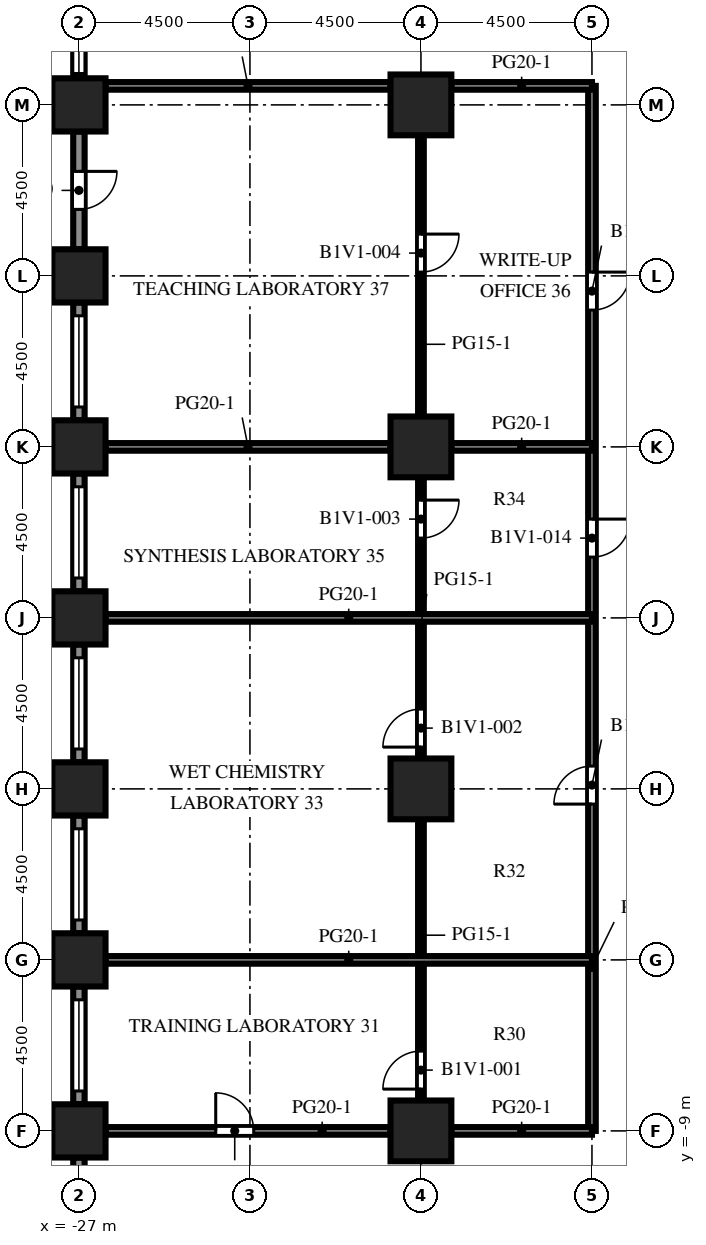
"""IFC4 building model, lengths in metres.
Left out: names, types, materials, properties, quantities, classifications, styles, units other than length and angle.
Written with IfcOpenShell. Run it as: python <this file> out.ifc"""

import sys

from ifc_helpers import new_model, si_unit, direction, frame, frame_2d, origin, origin_2d, place, context, subcontext, project, spatial, rectangle, extrude, element, fill, save


model = new_model("IFC4")
c1 = context("Model", 3, precision=1e-05, world=origin(), true_north=direction((0.0, 1.0)))
c2 = subcontext(c1, "Body", "Model", "MODEL_VIEW")
j1 = project(units=[si_unit("LENGTHUNIT", "METRE"), si_unit("PLANEANGLEUNIT", "RADIAN")], contexts=[c1])
p1 = place(None, origin())
s1 = spatial("IfcSite", under=j1, at=p1, CompositionType="ELEMENT")
p2 = place(p1, origin())
s2 = spatial("IfcBuilding", under=s1, at=p2, CompositionType="ELEMENT")
p3 = place(p2, frame((0.0, 0.0, 19.5)))
s3 = spatial("IfcBuildingStorey", under=s2, at=p3, CompositionType="ELEMENT", Elevation=19.5)
for number, where, z_axis, x_axis in (
    (1, (-27.0, -9.0, 0.0), (0.0, 0.0, 1.0), (1.0, 0.0, 0.0)),
    (2, (-27.0, -4.5, 0.0), (0.0, 0.0, 1.0), (1.0, 0.0, 0.0)),
    (3, (-27.0, 0.0, 0.0), (0.0, 0.0, 1.0), (1.0, 0.0, 0.0)),
    (4, (-27.0, 4.5, 0.0), (0.0, 0.0, 1.0), (1.0, 0.0, 0.0)),
    (5, (-27.0, 9.0, 0.0), (0.0, 0.0, 1.0), (1.0, 0.0, 0.0)),
    (6, (-27.0, 13.5, 0.0), (0.0, 0.0, 1.0), (1.0, 0.0, 0.0)),
    (7, (-27.0, 18.0, 0.0), (0.0, 0.0, 1.0), (1.0, 0.0, 0.0)),
):
    element("IfcColumn", number, at=place(p3, frame(where, z_axis=z_axis, x_axis=x_axis)), inside=s3, PredefinedType="COLUMN", context=c2, shape_type="SweptSolid", body=[
        extrude(rectangle(XDim=1.4, YDim=1.4, at=origin_2d()), origin(), (0.0, 0.0, 1.0), 4.1),
    ])
for number, where, z_axis, x_axis in (
    (8, (-18.0, -9.0, 0.0), (0.0, 0.0, 1.0), (1.0, 0.0, 0.0)),
    (9, (-18.0, 0.0, 0.0), (0.0, 0.0, 1.0), (1.0, 0.0, 0.0)),
    (10, (-18.0, 9.0, 0.0), (0.0, 0.0, 1.0), (1.0, 0.0, 0.0)),
    (11, (-18.0, 18.0, 0.0), (0.0, 0.0, 1.0), (1.0, 0.0, 0.0)),
):
    element("IfcColumn", number, at=place(p3, frame(where, z_axis=z_axis, x_axis=x_axis)), inside=s3, PredefinedType="COLUMN", context=c2, shape_type="SweptSolid", body=[
        extrude(rectangle(XDim=1.6, YDim=1.6, at=origin_2d()), origin(), (0.0, 0.0, 1.0), 4.1),
    ])
p4 = place(p3, frame((-27.0, 18.7, 0.0), z_axis=(0.0, 0.0, 1.0), x_axis=(0.0, 1.0, 0.0)))
e12 = element("IfcWall", 12, at=p4, inside=s3, PredefinedType="SOLIDWALL", context=c2, shape_type="SweptSolid", body=[
    extrude(rectangle(XDim=3.1, YDim=0.3, at=frame_2d((1.55, 0.0))), origin(), (0.0, 0.0, 1.0), 2.75),
])
p5 = place(p4, frame((0.125, 0.0, 0.8)))
e13 = element("IfcOpeningElement", 13, at=p5, cuts=e12, PredefinedType="OPENING", context=c2, shape_type="SweptSolid", body=[
    extrude(rectangle(XDim=2.4, YDim=1.7, at=frame_2d((1.2, 0.85))), frame((0.0, 0.16, 0.0), z_axis=(0.0, -1.0, 0.0), x_axis=(1.0, 0.0, 0.0)), (0.0, 0.0, 1.0), 0.32),
])
p6 = place(p3, frame((-27.0, 14.2, 0.0), z_axis=(0.0, 0.0, 1.0), x_axis=(0.0, 1.0, 0.0)))
e14 = element("IfcWall", 14, at=p6, inside=s3, PredefinedType="SOLIDWALL", context=c2, shape_type="SweptSolid", body=[
    extrude(rectangle(XDim=3.1, YDim=0.3, at=frame_2d((1.55, 0.0))), origin(), (0.0, 0.0, 1.0), 2.75),
])
p7 = place(p6, frame((1.05, 0.0, 0.0)))
e15 = element("IfcOpeningElement", 15, at=p7, cuts=e14, PredefinedType="OPENING", context=c2, shape_type="SweptSolid", body=[
    extrude(rectangle(XDim=1.0, YDim=2.2, at=frame_2d((0.5, 1.1))), frame((0.0, 0.16, 0.0), z_axis=(0.0, -1.0, 0.0), x_axis=(1.0, 0.0, 0.0)), (0.0, 0.0, 1.0), 0.32),
])
p8 = place(p3, frame((-27.0, 9.7, 0.0), z_axis=(0.0, 0.0, 1.0), x_axis=(0.0, 1.0, 0.0)))
e16 = element("IfcWall", 16, at=p8, inside=s3, PredefinedType="SOLIDWALL", context=c2, shape_type="SweptSolid", body=[
    extrude(rectangle(XDim=3.1, YDim=0.3, at=frame_2d((1.55, 0.0))), origin(), (0.0, 0.0, 1.0), 2.75),
])
p9 = place(p8, frame((0.35, 0.0, 0.8)))
e17 = element("IfcOpeningElement", 17, at=p9, cuts=e16, PredefinedType="OPENING", context=c2, shape_type="SweptSolid", body=[
    extrude(rectangle(XDim=2.4, YDim=1.7, at=frame_2d((1.2, 0.85))), frame((0.0, 0.16, 0.0), z_axis=(0.0, -1.0, 0.0), x_axis=(1.0, 0.0, 0.0)), (0.0, 0.0, 1.0), 0.32),
])
p10 = place(p3, frame((-27.0, 5.2, 0.0), z_axis=(0.0, 0.0, 1.0), x_axis=(0.0, 1.0, 0.0)))
e18 = element("IfcWall", 18, at=p10, inside=s3, PredefinedType="SOLIDWALL", context=c2, shape_type="SweptSolid", body=[
    extrude(rectangle(XDim=3.1, YDim=0.3, at=frame_2d((1.55, 0.0))), origin(), (0.0, 0.0, 1.0), 2.75),
])
p11 = place(p10, frame((0.35, 0.0, 0.8)))
e19 = element("IfcOpeningElement", 19, at=p11, cuts=e18, PredefinedType="OPENING", context=c2, shape_type="SweptSolid", body=[
    extrude(rectangle(XDim=2.4, YDim=1.7, at=frame_2d((1.2, 0.85))), frame((0.0, 0.16, 0.0), z_axis=(0.0, -1.0, 0.0), x_axis=(1.0, 0.0, 0.0)), (0.0, 0.0, 1.0), 0.32),
])
p12 = place(p3, frame((-27.0, 0.7, 0.0), z_axis=(0.0, 0.0, 1.0), x_axis=(0.0, 1.0, 0.0)))
e20 = element("IfcWall", 20, at=p12, inside=s3, PredefinedType="SOLIDWALL", context=c2, shape_type="SweptSolid", body=[
    extrude(rectangle(XDim=3.1, YDim=0.3, at=frame_2d((1.55, 0.0))), origin(), (0.0, 0.0, 1.0), 2.75),
])
p13 = place(p12, frame((0.35, 0.0, 0.8)))
e21 = element("IfcOpeningElement", 21, at=p13, cuts=e20, PredefinedType="OPENING", context=c2, shape_type="SweptSolid", body=[
    extrude(rectangle(XDim=2.4, YDim=1.7, at=frame_2d((1.2, 0.85))), frame((0.0, 0.16, 0.0), z_axis=(0.0, -1.0, 0.0), x_axis=(1.0, 0.0, 0.0)), (0.0, 0.0, 1.0), 0.32),
])
p14 = place(p3, frame((-27.0, -3.8, 0.0), z_axis=(0.0, 0.0, 1.0), x_axis=(0.0, 1.0, 0.0)))
e22 = element("IfcWall", 22, at=p14, inside=s3, PredefinedType="SOLIDWALL", context=c2, shape_type="SweptSolid", body=[
    extrude(rectangle(XDim=3.1, YDim=0.3, at=frame_2d((1.55, 0.0))), origin(), (0.0, 0.0, 1.0), 2.75),
])
p15 = place(p14, frame((0.35, 0.0, 0.8)))
e23 = element("IfcOpeningElement", 23, at=p15, cuts=e22, PredefinedType="OPENING", context=c2, shape_type="SweptSolid", body=[
    extrude(rectangle(XDim=2.4, YDim=1.7, at=frame_2d((1.2, 0.85))), frame((0.0, 0.16, 0.0), z_axis=(0.0, -1.0, 0.0), x_axis=(1.0, 0.0, 0.0)), (0.0, 0.0, 1.0), 0.32),
])
p16 = place(p3, frame((-27.0, -8.3, 0.0), z_axis=(0.0, 0.0, 1.0), x_axis=(0.0, 1.0, 0.0)))
e24 = element("IfcWall", 24, at=p16, inside=s3, PredefinedType="SOLIDWALL", context=c2, shape_type="SweptSolid", body=[
    extrude(rectangle(XDim=3.1, YDim=0.3, at=frame_2d((1.55, 0.0))), origin(), (0.0, 0.0, 1.0), 2.75),
])
p17 = place(p16, frame((0.35, 0.0, 0.8)))
e25 = element("IfcOpeningElement", 25, at=p17, cuts=e24, PredefinedType="OPENING", context=c2, shape_type="SweptSolid", body=[
    extrude(rectangle(XDim=2.4, YDim=1.7, at=frame_2d((1.2, 0.85))), frame((0.0, 0.16, 0.0), z_axis=(0.0, -1.0, 0.0), x_axis=(1.0, 0.0, 0.0)), (0.0, 0.0, 1.0), 0.32),
])
p18 = place(p3, frame((-27.0, -12.8, 0.0), z_axis=(0.0, 0.0, 1.0), x_axis=(0.0, 1.0, 0.0)))
e26 = element("IfcWall", 26, at=p18, inside=s3, PredefinedType="SOLIDWALL", context=c2, shape_type="SweptSolid", body=[
    extrude(rectangle(XDim=3.1, YDim=0.3, at=frame_2d((1.55, 0.0))), origin(), (0.0, 0.0, 1.0), 2.75),
])
p19 = place(p18, frame((1.425, 0.0, 0.8)))
e27 = element("IfcOpeningElement", 27, at=p19, cuts=e26, PredefinedType="OPENING", context=c2, shape_type="SweptSolid", body=[
    extrude(rectangle(XDim=1.2, YDim=1.7, at=frame_2d((0.6, 0.85))), frame((0.0, 0.16, 0.0), z_axis=(0.0, -1.0, 0.0), x_axis=(1.0, 0.0, 0.0)), (0.0, 0.0, 1.0), 0.32),
])
p20 = place(p3, frame((-18.0, -0.8, 0.0), z_axis=(0.0, 0.0, 1.0), x_axis=(0.0, -1.0, 0.0)))
e28 = element("IfcWall", 28, at=p20, inside=s3, PredefinedType="PARTITIONING", context=c2, shape_type="SweptSolid", body=[
    extrude(rectangle(XDim=7.4, YDim=0.15, at=frame_2d((3.7, 0.0))), origin(), (0.0, 0.0, 1.0), 3.65),
])
p21 = place(p20, frame((6.1, 0.0, 0.0)))
e29 = element("IfcOpeningElement", 29, at=p21, cuts=e28, PredefinedType="OPENING", context=c2, shape_type="SweptSolid", body=[
    extrude(rectangle(XDim=1.0, YDim=2.1, at=frame_2d((0.5, 1.05))), frame((0.0, 0.085, 0.0), z_axis=(0.0, -1.0, 0.0), x_axis=(1.0, 0.0, 0.0)), (0.0, 0.0, 1.0), 0.17),
])
p22 = place(p3, frame((-18.0, 0.8, 0.0), z_axis=(0.0, 0.0, 1.0), x_axis=(0.0, 1.0, 0.0)))
e30 = element("IfcWall", 30, at=p22, inside=s3, PredefinedType="PARTITIONING", context=c2, shape_type="SweptSolid", body=[
    extrude(rectangle(XDim=7.4, YDim=0.15, at=frame_2d((3.7, 0.0))), origin(), (0.0, 0.0, 1.0), 3.65),
])
p23 = place(p22, frame((0.3, 0.0, 0.0)))
e31 = element("IfcOpeningElement", 31, at=p23, cuts=e30, PredefinedType="OPENING", context=c2, shape_type="SweptSolid", body=[
    extrude(rectangle(XDim=1.0, YDim=2.1, at=frame_2d((0.5, 1.05))), frame((0.0, 0.085, 0.0), z_axis=(0.0, -1.0, 0.0), x_axis=(1.0, 0.0, 0.0)), (0.0, 0.0, 1.0), 0.17),
])
p24 = place(p22, frame((5.8, 0.0, 0.0)))
e32 = element("IfcOpeningElement", 32, at=p24, cuts=e30, PredefinedType="OPENING", context=c2, shape_type="SweptSolid", body=[
    extrude(rectangle(XDim=1.0, YDim=2.1, at=frame_2d((0.5, 1.05))), frame((0.0, 0.085, 0.0), z_axis=(0.0, -1.0, 0.0), x_axis=(1.0, 0.0, 0.0)), (0.0, 0.0, 1.0), 0.17),
])
p25 = place(p3, frame((-18.0, 9.8, 0.0), z_axis=(0.0, 0.0, 1.0), x_axis=(0.0, 1.0, 0.0)))
e33 = element("IfcWall", 33, at=p25, inside=s3, PredefinedType="PARTITIONING", context=c2, shape_type="SweptSolid", body=[
    extrude(rectangle(XDim=7.4, YDim=0.15, at=frame_2d((3.7, 0.0))), origin(), (0.0, 0.0, 1.0), 3.65),
])
p26 = place(p25, frame((3.8, 0.0, 0.0)))
e34 = element("IfcOpeningElement", 34, at=p26, cuts=e33, PredefinedType="OPENING", context=c2, shape_type="SweptSolid", body=[
    extrude(rectangle(XDim=1.0, YDim=2.1, at=frame_2d((0.5, 1.05))), frame((0.0, 0.085, 0.0), z_axis=(0.0, -1.0, 0.0), x_axis=(1.0, 0.0, 0.0)), (0.0, 0.0, 1.0), 0.17),
])
p27 = place(p3, frame((-13.5, -9.0, 0.0), z_axis=(0.0, 0.0, 1.0), x_axis=(0.0, 1.0, 0.0)))
e35 = element("IfcWall", 35, at=p27, inside=s3, PredefinedType="PARTITIONING", context=c2, shape_type="SweptSolid", body=[
    extrude(rectangle(XDim=27.5, YDim=0.2, at=frame_2d((13.75, 0.0))), origin(), (0.0, 0.0, 1.0), 3.65),
])
p28 = place(p27, frame((8.6, 0.0, 0.0)))
e36 = element("IfcOpeningElement", 36, at=p28, cuts=e35, PredefinedType="OPENING", context=c2, shape_type="SweptSolid", body=[
    extrude(rectangle(XDim=1.0, YDim=2.1, at=frame_2d((0.5, 1.05))), frame((0.0, 0.11, 0.0), z_axis=(0.0, -1.0, 0.0), x_axis=(1.0, 0.0, 0.0)), (0.0, 0.0, 1.0), 0.22),
])
p29 = place(p27, frame((15.1, 0.0, 0.0)))
e37 = element("IfcOpeningElement", 37, at=p29, cuts=e35, PredefinedType="OPENING", context=c2, shape_type="SweptSolid", body=[
    extrude(rectangle(XDim=1.0, YDim=2.1, at=frame_2d((0.5, 1.05))), frame((0.0, 0.11, 0.0), z_axis=(0.0, -1.0, 0.0), x_axis=(1.0, 0.0, 0.0)), (0.0, 0.0, 1.0), 0.22),
])
p30 = place(p27, frame((21.6, 0.0, 0.0)))
e38 = element("IfcOpeningElement", 38, at=p30, cuts=e35, PredefinedType="OPENING", context=c2, shape_type="SweptSolid", body=[
    extrude(rectangle(XDim=1.0, YDim=2.1, at=frame_2d((0.5, 1.05))), frame((0.0, 0.11, 0.0), z_axis=(0.0, -1.0, 0.0), x_axis=(1.0, 0.0, 0.0)), (0.0, 0.0, 1.0), 0.22),
])
p31 = place(p3, frame((-26.3, -9.0, 0.0), z_axis=(0.0, 0.0, 1.0), x_axis=(1.0, 0.0, 0.0)))
e39 = element("IfcWall", 39, at=p31, inside=s3, PredefinedType="PARTITIONING", context=c2, shape_type="SweptSolid", body=[
    extrude(rectangle(XDim=7.5, YDim=0.2, at=frame_2d((3.75, 0.0))), origin(), (0.0, 0.0, 1.0), 3.65),
])
p32 = place(p31, frame((2.9, 0.0, 0.0)))
e40 = element("IfcOpeningElement", 40, at=p32, cuts=e39, PredefinedType="OPENING", context=c2, shape_type="SweptSolid", body=[
    extrude(rectangle(XDim=1.0, YDim=2.1, at=frame_2d((0.5, 1.05))), frame((0.0, 0.11, 0.0), z_axis=(0.0, -1.0, 0.0), x_axis=(1.0, 0.0, 0.0)), (0.0, 0.0, 1.0), 0.22),
])
p33 = place(p3, frame((-17.2, -9.0, 0.0), z_axis=(0.0, 0.0, 1.0), x_axis=(1.0, 0.0, 0.0)))
e41 = element("IfcWall", 41, at=p33, inside=s3, PredefinedType="PARTITIONING", context=c2, shape_type="SweptSolid", body=[
    extrude(rectangle(XDim=3.7, YDim=0.2, at=frame_2d((1.85, 0.0))), origin(), (0.0, 0.0, 1.0), 3.65),
])
for number, where, z_axis, x_axis in (
    (42, (-26.3, -4.5, 0.0), (0.0, 0.0, 1.0), (1.0, 0.0, 0.0)),
    (43, (-26.3, 4.5, 0.0), (0.0, 0.0, 1.0), (1.0, 0.0, 0.0)),
):
    element("IfcWall", number, at=place(p3, frame(where, z_axis=z_axis, x_axis=x_axis)), inside=s3, PredefinedType="PARTITIONING", context=c2, shape_type="SweptSolid", body=[
        extrude(rectangle(XDim=12.8, YDim=0.2, at=frame_2d((6.4, 0.0))), origin(), (0.0, 0.0, 1.0), 3.65),
    ])
p34 = place(p3, frame((-26.3, 9.0, 0.0), z_axis=(0.0, 0.0, 1.0), x_axis=(1.0, 0.0, 0.0)))
e44 = element("IfcWall", 44, at=p34, inside=s3, PredefinedType="PARTITIONING", context=c2, shape_type="SweptSolid", body=[
    extrude(rectangle(XDim=7.5, YDim=0.2, at=frame_2d((3.75, 0.0))), origin(), (0.0, 0.0, 1.0), 3.65),
])
p35 = place(p3, frame((-17.2, 9.0, 0.0), z_axis=(0.0, 0.0, 1.0), x_axis=(1.0, 0.0, 0.0)))
e45 = element("IfcWall", 45, at=p35, inside=s3, PredefinedType="PARTITIONING", context=c2, shape_type="SweptSolid", body=[
    extrude(rectangle(XDim=3.7, YDim=0.2, at=frame_2d((1.85, 0.0))), origin(), (0.0, 0.0, 1.0), 3.65),
])
p36 = place(p3, frame((-26.3, 18.5, 0.0), z_axis=(0.0, 0.0, 1.0), x_axis=(1.0, 0.0, 0.0)))
e46 = element("IfcWall", 46, at=p36, inside=s3, PredefinedType="PARTITIONING", context=c2, shape_type="SweptSolid", body=[
    extrude(rectangle(XDim=7.5, YDim=0.2, at=frame_2d((3.75, 0.0))), origin(), (0.0, 0.0, 1.0), 3.65),
])
p37 = place(p3, frame((-17.2, 18.5, 0.0), z_axis=(0.0, 0.0, 1.0), x_axis=(1.0, 0.0, 0.0)))
e47 = element("IfcWall", 47, at=p37, inside=s3, PredefinedType="PARTITIONING", context=c2, shape_type="SweptSolid", body=[
    extrude(rectangle(XDim=3.7, YDim=0.2, at=frame_2d((1.85, 0.0))), origin(), (0.0, 0.0, 1.0), 3.65),
])
p38 = place(p5, origin())
e48 = element("IfcWindow", 48, at=p38, inside=s3, PartitioningType="SINGLE_PANEL", PredefinedType="WINDOW", context=c2, shape_type="SweptSolid", body=[
    extrude(rectangle(XDim=2.4, YDim=1.7, at=frame_2d((1.2, 0.85))), frame((0.0, 0.03, 0.0), z_axis=(0.0, -1.0, 0.0), x_axis=(1.0, 0.0, 0.0)), (0.0, 0.0, 1.0), 0.06),
])
fill(e13, e48)
p39 = place(p7, origin())
e49 = element("IfcDoor", 49, at=p39, inside=s3, OperationType="SINGLE_SWING_RIGHT", PredefinedType="DOOR", context=c2, shape_type="SweptSolid", body=[
    extrude(rectangle(XDim=1.0, YDim=2.2, at=frame_2d((0.5, 1.1))), frame((0.0, 0.025, 0.0), z_axis=(0.0, -1.0, 0.0), x_axis=(1.0, 0.0, 0.0)), (0.0, 0.0, 1.0), 0.05),
])
fill(e15, e49)
p40 = place(p9, origin())
e50 = element("IfcWindow", 50, at=p40, inside=s3, PartitioningType="SINGLE_PANEL", PredefinedType="WINDOW", context=c2, shape_type="SweptSolid", body=[
    extrude(rectangle(XDim=2.4, YDim=1.7, at=frame_2d((1.2, 0.85))), frame((0.0, 0.03, 0.0), z_axis=(0.0, -1.0, 0.0), x_axis=(1.0, 0.0, 0.0)), (0.0, 0.0, 1.0), 0.06),
])
fill(e17, e50)
p41 = place(p11, origin())
e51 = element("IfcWindow", 51, at=p41, inside=s3, PartitioningType="SINGLE_PANEL", PredefinedType="WINDOW", context=c2, shape_type="SweptSolid", body=[
    extrude(rectangle(XDim=2.4, YDim=1.7, at=frame_2d((1.2, 0.85))), frame((0.0, 0.03, 0.0), z_axis=(0.0, -1.0, 0.0), x_axis=(1.0, 0.0, 0.0)), (0.0, 0.0, 1.0), 0.06),
])
fill(e19, e51)
p42 = place(p13, origin())
e52 = element("IfcWindow", 52, at=p42, inside=s3, PartitioningType="SINGLE_PANEL", PredefinedType="WINDOW", context=c2, shape_type="SweptSolid", body=[
    extrude(rectangle(XDim=2.4, YDim=1.7, at=frame_2d((1.2, 0.85))), frame((0.0, 0.03, 0.0), z_axis=(0.0, -1.0, 0.0), x_axis=(1.0, 0.0, 0.0)), (0.0, 0.0, 1.0), 0.06),
])
fill(e21, e52)
p43 = place(p15, origin())
e53 = element("IfcWindow", 53, at=p43, inside=s3, PartitioningType="SINGLE_PANEL", PredefinedType="WINDOW", context=c2, shape_type="SweptSolid", body=[
    extrude(rectangle(XDim=2.4, YDim=1.7, at=frame_2d((1.2, 0.85))), frame((0.0, 0.03, 0.0), z_axis=(0.0, -1.0, 0.0), x_axis=(1.0, 0.0, 0.0)), (0.0, 0.0, 1.0), 0.06),
])
fill(e23, e53)
p44 = place(p17, origin())
e54 = element("IfcWindow", 54, at=p44, inside=s3, PartitioningType="SINGLE_PANEL", PredefinedType="WINDOW", context=c2, shape_type="SweptSolid", body=[
    extrude(rectangle(XDim=2.4, YDim=1.7, at=frame_2d((1.2, 0.85))), frame((0.0, 0.03, 0.0), z_axis=(0.0, -1.0, 0.0), x_axis=(1.0, 0.0, 0.0)), (0.0, 0.0, 1.0), 0.06),
])
fill(e25, e54)
p45 = place(p21, origin())
e55 = element("IfcDoor", 55, at=p45, inside=s3, OperationType="SINGLE_SWING_RIGHT", PredefinedType="DOOR", context=c2, shape_type="SweptSolid", body=[
    extrude(rectangle(XDim=1.0, YDim=2.1, at=frame_2d((0.5, 1.05))), frame((0.0, 0.025, 0.0), z_axis=(0.0, -1.0, 0.0), x_axis=(1.0, 0.0, 0.0)), (0.0, 0.0, 1.0), 0.05),
])
fill(e29, e55)
p46 = place(p23, origin())
e56 = element("IfcDoor", 56, at=p46, inside=s3, OperationType="SINGLE_SWING_LEFT", PredefinedType="DOOR", context=c2, shape_type="SweptSolid", body=[
    extrude(rectangle(XDim=1.0, YDim=2.1, at=frame_2d((0.5, 1.05))), frame((0.0, 0.025, 0.0), z_axis=(0.0, -1.0, 0.0), x_axis=(1.0, 0.0, 0.0)), (0.0, 0.0, 1.0), 0.05),
])
fill(e31, e56)
p47 = place(p24, origin())
e57 = element("IfcDoor", 57, at=p47, inside=s3, OperationType="SINGLE_SWING_RIGHT", PredefinedType="DOOR", context=c2, shape_type="SweptSolid", body=[
    extrude(rectangle(XDim=1.0, YDim=2.1, at=frame_2d((0.5, 1.05))), frame((0.0, 0.025, 0.0), z_axis=(0.0, -1.0, 0.0), x_axis=(1.0, 0.0, 0.0)), (0.0, 0.0, 1.0), 0.05),
])
fill(e32, e57)
p48 = place(p26, origin())
e58 = element("IfcDoor", 58, at=p48, inside=s3, OperationType="SINGLE_SWING_RIGHT", PredefinedType="DOOR", context=c2, shape_type="SweptSolid", body=[
    extrude(rectangle(XDim=1.0, YDim=2.1, at=frame_2d((0.5, 1.05))), frame((0.0, 0.025, 0.0), z_axis=(0.0, -1.0, 0.0), x_axis=(1.0, 0.0, 0.0)), (0.0, 0.0, 1.0), 0.05),
])
fill(e34, e58)
p49 = place(p28, origin())
e59 = element("IfcDoor", 59, at=p49, inside=s3, OperationType="SINGLE_SWING_LEFT", PredefinedType="DOOR", context=c2, shape_type="SweptSolid", body=[
    extrude(rectangle(XDim=1.0, YDim=2.1, at=frame_2d((0.5, 1.05))), frame((0.0, 0.025, 0.0), z_axis=(0.0, -1.0, 0.0), x_axis=(1.0, 0.0, 0.0)), (0.0, 0.0, 1.0), 0.05),
])
fill(e36, e59)
p50 = place(p29, origin())
e60 = element("IfcDoor", 60, at=p50, inside=s3, OperationType="SINGLE_SWING_RIGHT", PredefinedType="DOOR", context=c2, shape_type="SweptSolid", body=[
    extrude(rectangle(XDim=1.0, YDim=2.1, at=frame_2d((0.5, 1.05))), frame((0.0, 0.025, 0.0), z_axis=(0.0, -1.0, 0.0), x_axis=(1.0, 0.0, 0.0)), (0.0, 0.0, 1.0), 0.05),
])
fill(e37, e60)
p51 = place(p30, origin())
e61 = element("IfcDoor", 61, at=p51, inside=s3, OperationType="SINGLE_SWING_RIGHT", PredefinedType="DOOR", context=c2, shape_type="SweptSolid", body=[
    extrude(rectangle(XDim=1.0, YDim=2.1, at=frame_2d((0.5, 1.05))), frame((0.0, 0.025, 0.0), z_axis=(0.0, -1.0, 0.0), x_axis=(1.0, 0.0, 0.0)), (0.0, 0.0, 1.0), 0.05),
])
fill(e38, e61)
p52 = place(p32, origin())
e62 = element("IfcDoor", 62, at=p52, inside=s3, OperationType="SINGLE_SWING_LEFT", PredefinedType="DOOR", context=c2, shape_type="SweptSolid", body=[
    extrude(rectangle(XDim=1.0, YDim=2.1, at=frame_2d((0.5, 1.05))), frame((0.0, 0.025, 0.0), z_axis=(0.0, -1.0, 0.0), x_axis=(1.0, 0.0, 0.0)), (0.0, 0.0, 1.0), 0.05),
])
fill(e40, e62)
save(model, sys.argv[1])
